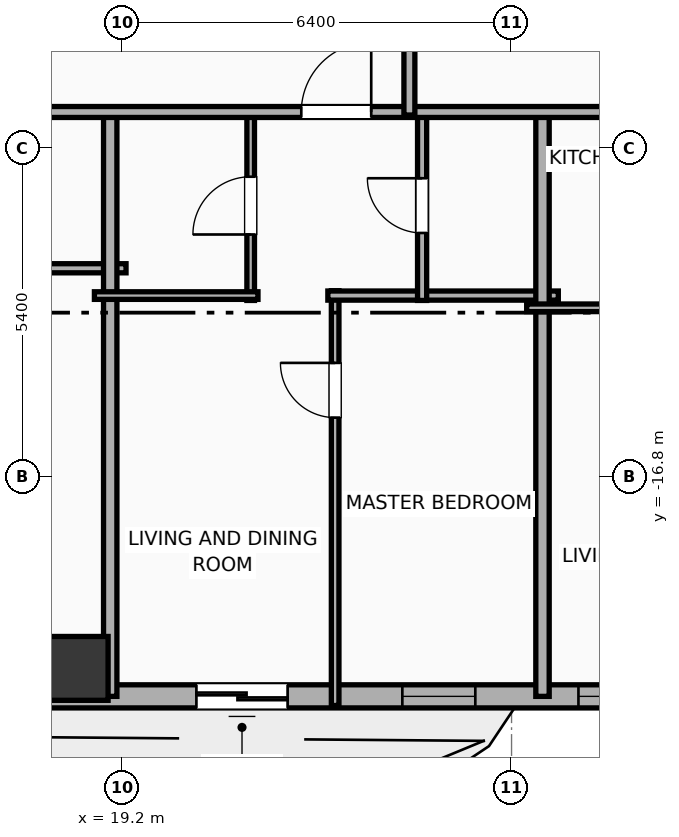
"""IFC4 building model, lengths in metres.
Left out: names, types, materials, properties, quantities, classifications, styles, units other than length and angle.
Written with IfcOpenShell. Run it as: python <this file> out.ifc"""

import sys

from ifc_helpers import new_model, si_unit, direction, frame, frame_2d, origin, origin_2d, place, context, subcontext, project, spatial, rectangle, hollow_rectangle, extrude, element, fill, save


model = new_model("IFC4")
c1 = context("Model", 3, precision=1e-05, world=origin(), true_north=direction((0.0, 1.0)))
c2 = subcontext(c1, "Body", "Model", "MODEL_VIEW")
j1 = project(units=[si_unit("LENGTHUNIT", "METRE"), si_unit("PLANEANGLEUNIT", "RADIAN")], contexts=[c1])
p1 = place(None, origin())
s1 = spatial("IfcSite", under=j1, at=p1, CompositionType="ELEMENT")
p2 = place(p1, origin())
s2 = spatial("IfcBuilding", under=s1, at=p2, CompositionType="ELEMENT")
p3 = place(p2, frame((0.0, 0.0, 85.8)))
s3 = spatial("IfcBuildingStorey", under=s2, at=p3, CompositionType="ELEMENT", Elevation=85.8)
p4 = place(p3, frame((18.44, -19.95, -0.4), z_axis=(0.0, 0.0, 1.0), x_axis=(1.0, 0.0, 0.0)))
e1 = element("IfcColumn", 1, at=p4, inside=s3, PredefinedType="COLUMN", context=c2, shape_type="SweptSolid", body=[
    extrude(hollow_rectangle(XDim=1.05, YDim=1.05, WallThickness=0.036, at=origin_2d()), origin(), (0.0, 0.0, 1.0), 4.3),
])
p5 = place(p3, frame((29.381, -20.41, 0.0), z_axis=(0.0, 0.0, 1.0), x_axis=(-1.0, 0.0, 0.0)))
e2 = element("IfcWall", 2, at=p5, inside=s3, PredefinedType="ELEMENTEDWALL", context=c2, shape_type="SweptSolid", body=[
    extrude(rectangle(XDim=54.763, YDim=0.38, at=frame_2d((27.381, 0.0))), origin(), (0.0, 0.0, 1.0), 2.54),
])
p6 = place(p5, frame((18.486, 0.0, 0.75)))
e3 = element("IfcOpeningElement", 3, at=p6, cuts=e2, PredefinedType="OPENING", context=c2, shape_type="SweptSolid", body=[
    extrude(rectangle(XDim=2.4, YDim=1.45, at=frame_2d((1.2, 0.725))), frame((0.0, 0.2, 0.0), z_axis=(0.0, -1.0, 0.0), x_axis=(1.0, 0.0, 0.0)), (0.0, 0.0, 1.0), 0.4),
])
p7 = place(p5, frame((47.567, 0.0, 0.75)))
e4 = element("IfcOpeningElement", 4, at=p7, cuts=e2, PredefinedType="OPENING", context=c2, shape_type="SweptSolid", body=[
    extrude(rectangle(XDim=2.4, YDim=1.45, at=frame_2d((1.2, 0.725))), frame((0.0, 0.2, 0.0), z_axis=(0.0, -1.0, 0.0), x_axis=(1.0, 0.0, 0.0)), (0.0, 0.0, 1.0), 0.4),
])
p8 = place(p5, frame((7.464, 0.0, 0.0)))
e5 = element("IfcOpeningElement", 5, at=p8, cuts=e2, PredefinedType="OPENING", context=c2, shape_type="SweptSolid", body=[
    extrude(rectangle(XDim=1.5, YDim=2.05, at=frame_2d((0.75, 1.025))), frame((0.0, 0.2, 0.0), z_axis=(0.0, -1.0, 0.0), x_axis=(1.0, 0.0, 0.0)), (0.0, 0.0, 1.0), 0.4),
])
p9 = place(p5, frame((51.831, 0.0, 0.55)))
e6 = element("IfcOpeningElement", 6, at=p9, cuts=e2, PredefinedType="OPENING", context=c2, shape_type="SweptSolid", body=[
    extrude(rectangle(XDim=1.2, YDim=1.15, at=frame_2d((0.6, 0.575))), frame((0.0, 0.2, 0.0), z_axis=(0.0, -1.0, 0.0), x_axis=(1.0, 0.0, 0.0)), (0.0, 0.0, 1.0), 0.4),
])
p10 = place(p5, frame((44.606, 0.0, 0.55)))
e7 = element("IfcOpeningElement", 7, at=p10, cuts=e2, PredefinedType="OPENING", context=c2, shape_type="SweptSolid", body=[
    extrude(rectangle(XDim=1.2, YDim=1.15, at=frame_2d((0.6, 0.575))), frame((0.0, 0.2, 0.0), z_axis=(0.0, -1.0, 0.0), x_axis=(1.0, 0.0, 0.0)), (0.0, 0.0, 1.0), 0.4),
])
p11 = place(p5, frame((38.906, 0.0, 0.55)))
e8 = element("IfcOpeningElement", 8, at=p11, cuts=e2, PredefinedType="OPENING", context=c2, shape_type="SweptSolid", body=[
    extrude(rectangle(XDim=1.2, YDim=1.15, at=frame_2d((0.6, 0.575))), frame((0.0, 0.2, 0.0), z_axis=(0.0, -1.0, 0.0), x_axis=(1.0, 0.0, 0.0)), (0.0, 0.0, 1.0), 0.4),
])
p12 = place(p5, frame((41.656, 0.0, 0.55)))
e9 = element("IfcOpeningElement", 9, at=p12, cuts=e2, PredefinedType="OPENING", context=c2, shape_type="SweptSolid", body=[
    extrude(rectangle(XDim=1.2, YDim=1.15, at=frame_2d((0.6, 0.575))), frame((0.0, 0.2, 0.0), z_axis=(0.0, -1.0, 0.0), x_axis=(1.0, 0.0, 0.0)), (0.0, 0.0, 1.0), 0.4),
])
p13 = place(p5, frame((33.666, 0.0, 0.55)))
e10 = element("IfcOpeningElement", 10, at=p13, cuts=e2, PredefinedType="OPENING", context=c2, shape_type="SweptSolid", body=[
    extrude(rectangle(XDim=1.2, YDim=1.15, at=frame_2d((0.6, 0.575))), frame((0.0, 0.2, 0.0), z_axis=(0.0, -1.0, 0.0), x_axis=(1.0, 0.0, 0.0)), (0.0, 0.0, 1.0), 0.4),
])
p14 = place(p5, frame((36.176, 0.0, 0.55)))
e11 = element("IfcOpeningElement", 11, at=p14, cuts=e2, PredefinedType="OPENING", context=c2, shape_type="SweptSolid", body=[
    extrude(rectangle(XDim=1.2, YDim=1.15, at=frame_2d((0.6, 0.575))), frame((0.0, 0.2, 0.0), z_axis=(0.0, -1.0, 0.0), x_axis=(1.0, 0.0, 0.0)), (0.0, 0.0, 1.0), 0.4),
])
p15 = place(p5, frame((27.861, 0.0, 0.55)))
e12 = element("IfcOpeningElement", 12, at=p15, cuts=e2, PredefinedType="OPENING", context=c2, shape_type="SweptSolid", body=[
    extrude(rectangle(XDim=1.2, YDim=1.15, at=frame_2d((0.6, 0.575))), frame((0.0, 0.2, 0.0), z_axis=(0.0, -1.0, 0.0), x_axis=(1.0, 0.0, 0.0)), (0.0, 0.0, 1.0), 0.4),
])
p16 = place(p5, frame((30.611, 0.0, 0.55)))
e13 = element("IfcOpeningElement", 13, at=p16, cuts=e2, PredefinedType="OPENING", context=c2, shape_type="SweptSolid", body=[
    extrude(rectangle(XDim=1.2, YDim=1.15, at=frame_2d((0.6, 0.575))), frame((0.0, 0.2, 0.0), z_axis=(0.0, -1.0, 0.0), x_axis=(1.0, 0.0, 0.0)), (0.0, 0.0, 1.0), 0.4),
])
p17 = place(p5, frame((23.531, 0.0, 0.55)))
e14 = element("IfcOpeningElement", 14, at=p17, cuts=e2, PredefinedType="OPENING", context=c2, shape_type="SweptSolid", body=[
    extrude(rectangle(XDim=1.2, YDim=1.15, at=frame_2d((0.6, 0.575))), frame((0.0, 0.2, 0.0), z_axis=(0.0, -1.0, 0.0), x_axis=(1.0, 0.0, 0.0)), (0.0, 0.0, 1.0), 0.4),
])
p18 = place(p5, frame((16.386, 0.0, 0.55)))
e15 = element("IfcOpeningElement", 15, at=p18, cuts=e2, PredefinedType="OPENING", context=c2, shape_type="SweptSolid", body=[
    extrude(rectangle(XDim=1.2, YDim=1.15, at=frame_2d((0.6, 0.575))), frame((0.0, 0.2, 0.0), z_axis=(0.0, -1.0, 0.0), x_axis=(1.0, 0.0, 0.0)), (0.0, 0.0, 1.0), 0.4),
])
p19 = place(p5, frame((12.531, 0.0, 0.55)))
e16 = element("IfcOpeningElement", 16, at=p19, cuts=e2, PredefinedType="OPENING", context=c2, shape_type="SweptSolid", body=[
    extrude(rectangle(XDim=1.2, YDim=1.15, at=frame_2d((0.6, 0.575))), frame((0.0, 0.2, 0.0), z_axis=(0.0, -1.0, 0.0), x_axis=(1.0, 0.0, 0.0)), (0.0, 0.0, 1.0), 0.4),
])
p20 = place(p5, frame((4.377, 0.0, 0.55)))
e17 = element("IfcOpeningElement", 17, at=p20, cuts=e2, PredefinedType="OPENING", context=c2, shape_type="SweptSolid", body=[
    extrude(rectangle(XDim=1.2, YDim=1.15, at=frame_2d((0.6, 0.575))), frame((0.0, 0.2, 0.0), z_axis=(0.0, -1.0, 0.0), x_axis=(1.0, 0.0, 0.0)), (0.0, 0.0, 1.0), 0.4),
])
p21 = place(p5, frame((1.481, 0.0, 0.55)))
e18 = element("IfcOpeningElement", 18, at=p21, cuts=e2, PredefinedType="OPENING", context=c2, shape_type="SweptSolid", body=[
    extrude(rectangle(XDim=1.2, YDim=1.15, at=frame_2d((0.6, 0.575))), frame((0.0, 0.2, 0.0), z_axis=(0.0, -1.0, 0.0), x_axis=(1.0, 0.0, 0.0)), (0.0, 0.0, 1.0), 0.4),
])
p22 = place(p3, frame((17.051, -13.37, 0.0), z_axis=(0.0, 0.0, 1.0), x_axis=(1.0, 0.0, 0.0)))
e19 = element("IfcWall", 19, at=p22, inside=s3, PredefinedType="PLUMBINGWALL", context=c2, shape_type="SweptSolid", body=[
    extrude(rectangle(XDim=2.209, YDim=0.15, at=frame_2d((1.104, 0.0))), origin(), (0.0, 0.0, 1.0), 3.65),
])
p23 = place(p3, frame((19.0, -20.41, 0.0), z_axis=(0.0, 0.0, 1.0), x_axis=(0.0, 1.0, 0.0)))
e20 = element("IfcWall", 20, at=p23, inside=s3, PredefinedType="PARTITIONING", context=c2, shape_type="SweptSolid", body=[
    extrude(rectangle(XDim=9.69, YDim=0.22, at=frame_2d((4.845, 0.0))), origin(), (0.0, 0.0, 1.0), 2.54),
])
p24 = place(p3, frame((22.699, -20.56, 0.0), z_axis=(0.0, 0.0, 1.0), x_axis=(0.0, 1.0, 0.0)))
e21 = element("IfcWall", 21, at=p24, inside=s3, PredefinedType="PARTITIONING", context=c2, shape_type="SweptSolid", body=[
    extrude(rectangle(XDim=6.821, YDim=0.125, at=frame_2d((3.411, 0.0))), origin(), (0.0, 0.0, 1.0), 3.65),
])
p25 = place(p24, frame((4.734, 0.0, 0.0)))
e22 = element("IfcOpeningElement", 22, at=p25, cuts=e21, PredefinedType="OPENING", context=c2, shape_type="SweptSolid", body=[
    extrude(rectangle(XDim=0.9, YDim=2.05, at=frame_2d((0.45, 1.025))), frame((0.0, 0.073, 0.0), z_axis=(0.0, -1.0, 0.0), x_axis=(1.0, 0.0, 0.0)), (0.0, 0.0, 1.0), 0.145),
])
p26 = place(p3, frame((22.579, -13.819, 0.0), z_axis=(0.0, 0.0, 1.0), x_axis=(1.0, 0.0, 0.0)))
e23 = element("IfcWall", 23, at=p26, inside=s3, PredefinedType="PLUMBINGWALL", context=c2, shape_type="SweptSolid", body=[
    extrude(rectangle(XDim=3.79, YDim=0.15, at=frame_2d((1.895, 0.0))), origin(), (0.0, 0.0, 1.0), 3.65),
])
p27 = place(p3, frame((21.31, -13.899, 0.0), z_axis=(0.0, 0.0, 1.0), x_axis=(0.0, 1.0, 0.0)))
e24 = element("IfcWall", 24, at=p27, inside=s3, PredefinedType="PARTITIONING", context=c2, shape_type="SweptSolid", body=[
    extrude(rectangle(XDim=3.119, YDim=0.125, at=frame_2d((1.56, 0.0))), origin(), (0.0, 0.0, 1.0), 3.65),
])
p28 = place(p27, frame((1.084, 0.0, 0.0)))
e25 = element("IfcOpeningElement", 25, at=p28, cuts=e24, PredefinedType="OPENING", context=c2, shape_type="SweptSolid", body=[
    extrude(rectangle(XDim=0.95, YDim=2.05, at=frame_2d((0.475, 1.025))), frame((0.0, 0.073, 0.0), z_axis=(0.0, -1.0, 0.0), x_axis=(1.0, 0.0, 0.0)), (0.0, 0.0, 1.0), 0.145),
])
p29 = place(p3, frame((18.74, -13.819, 0.0), z_axis=(0.0, 0.0, 1.0), x_axis=(1.0, 0.0, 0.0)))
e26 = element("IfcWall", 26, at=p29, inside=s3, PredefinedType="PARTITIONING", context=c2, shape_type="SweptSolid", body=[
    extrude(rectangle(XDim=2.69, YDim=0.125, at=frame_2d((1.345, 0.0))), origin(), (0.0, 0.0, 1.0), 3.65),
])
p30 = place(p3, frame((24.129, -13.899, 0.0), z_axis=(0.0, 0.0, 1.0), x_axis=(0.0, 1.0, 0.0)))
e27 = element("IfcWall", 27, at=p30, inside=s3, PredefinedType="PLUMBINGWALL", context=c2, shape_type="SweptSolid", body=[
    extrude(rectangle(XDim=3.119, YDim=0.15, at=frame_2d((1.56, 0.0))), origin(), (0.0, 0.0, 1.0), 3.65),
])
p31 = place(p30, frame((1.11, 0.0, 0.0)))
e28 = element("IfcOpeningElement", 28, at=p31, cuts=e27, PredefinedType="OPENING", context=c2, shape_type="SweptSolid", body=[
    extrude(rectangle(XDim=0.9, YDim=2.05, at=frame_2d((0.45, 1.025))), frame((0.0, 0.085, 0.0), z_axis=(0.0, -1.0, 0.0), x_axis=(1.0, 0.0, 0.0)), (0.0, 0.0, 1.0), 0.17),
])
p32 = place(p3, frame((26.109, -20.41, 0.0), z_axis=(0.0, 0.0, 1.0), x_axis=(0.0, 1.0, 0.0)))
e29 = element("IfcWall", 29, at=p32, inside=s3, PredefinedType="PARTITIONING", context=c2, shape_type="SweptSolid", body=[
    extrude(rectangle(XDim=9.69, YDim=0.22, at=frame_2d((4.845, 0.0))), origin(), (0.0, 0.0, 1.0), 3.65),
])
p33 = place(p3, frame((25.849, -14.02, 0.0), z_axis=(0.0, 0.0, 1.0), x_axis=(1.0, 0.0, 0.0)))
e30 = element("IfcWall", 30, at=p33, inside=s3, PredefinedType="PARTITIONING", context=c2, shape_type="SweptSolid", body=[
    extrude(rectangle(XDim=2.69, YDim=0.125, at=frame_2d((1.345, 0.0))), origin(), (0.0, 0.0, 1.0), 3.65),
])
p34 = place(p3, frame((-29.21, -10.8, 0.0), z_axis=(0.0, 0.0, 1.0), x_axis=(1.0, 0.0, 0.0)))
e31 = element("IfcWall", 31, at=p34, inside=s3, PredefinedType="PARTITIONING", context=c2, shape_type="SweptSolid", body=[
    extrude(rectangle(XDim=62.42, YDim=0.18, at=frame_2d((31.21, 0.0))), origin(), (0.0, 0.0, 1.0), 3.65),
])
p35 = place(p34, frame((3.357, 0.0, 0.0)))
e32 = element("IfcOpeningElement", 32, at=p35, cuts=e31, PredefinedType="OPENING", context=c2, shape_type="SweptSolid", body=[
    extrude(rectangle(XDim=1.15, YDim=2.05, at=frame_2d((0.575, 1.025))), frame((0.0, 0.1, 0.0), z_axis=(0.0, -1.0, 0.0), x_axis=(1.0, 0.0, 0.0)), (0.0, 0.0, 1.0), 0.2),
])
p36 = place(p34, frame((10.998, 0.0, 0.0)))
e33 = element("IfcOpeningElement", 33, at=p36, cuts=e31, PredefinedType="OPENING", context=c2, shape_type="SweptSolid", body=[
    extrude(rectangle(XDim=1.15, YDim=2.05, at=frame_2d((0.575, 1.025))), frame((0.0, 0.1, 0.0), z_axis=(0.0, -1.0, 0.0), x_axis=(1.0, 0.0, 0.0)), (0.0, 0.0, 1.0), 0.2),
])
p37 = place(p34, frame((18.482, 0.0, 0.0)))
e34 = element("IfcOpeningElement", 34, at=p37, cuts=e31, PredefinedType="OPENING", context=c2, shape_type="SweptSolid", body=[
    extrude(rectangle(XDim=1.15, YDim=2.05, at=frame_2d((0.575, 1.025))), frame((0.0, 0.1, 0.0), z_axis=(0.0, -1.0, 0.0), x_axis=(1.0, 0.0, 0.0)), (0.0, 0.0, 1.0), 0.2),
])
p38 = place(p34, frame((23.962, 0.0, 0.0)))
e35 = element("IfcOpeningElement", 35, at=p38, cuts=e31, PredefinedType="OPENING", context=c2, shape_type="SweptSolid", body=[
    extrude(rectangle(XDim=1.15, YDim=2.05, at=frame_2d((0.575, 1.025))), frame((0.0, 0.1, 0.0), z_axis=(0.0, -1.0, 0.0), x_axis=(1.0, 0.0, 0.0)), (0.0, 0.0, 1.0), 0.2),
])
p39 = place(p34, frame((29.524, 0.0, 0.0)))
e36 = element("IfcOpeningElement", 36, at=p39, cuts=e31, PredefinedType="OPENING", context=c2, shape_type="SweptSolid", body=[
    extrude(rectangle(XDim=1.15, YDim=2.05, at=frame_2d((0.575, 1.025))), frame((0.0, 0.1, 0.0), z_axis=(0.0, -1.0, 0.0), x_axis=(1.0, 0.0, 0.0)), (0.0, 0.0, 1.0), 0.2),
])
p40 = place(p34, frame((34.218, 0.0, 0.0)))
e37 = element("IfcOpeningElement", 37, at=p40, cuts=e31, PredefinedType="OPENING", context=c2, shape_type="SweptSolid", body=[
    extrude(rectangle(XDim=0.9, YDim=2.05, at=frame_2d((0.45, 1.025))), frame((0.0, 0.1, 0.0), z_axis=(0.0, -1.0, 0.0), x_axis=(1.0, 0.0, 0.0)), (0.0, 0.0, 1.0), 0.2),
])
p41 = place(p34, frame((38.313, 0.0, 0.0)))
e38 = element("IfcOpeningElement", 38, at=p41, cuts=e31, PredefinedType="OPENING", context=c2, shape_type="SweptSolid", body=[
    extrude(rectangle(XDim=1.15, YDim=2.05, at=frame_2d((0.575, 1.025))), frame((0.0, 0.1, 0.0), z_axis=(0.0, -1.0, 0.0), x_axis=(1.0, 0.0, 0.0)), (0.0, 0.0, 1.0), 0.2),
])
p42 = place(p34, frame((45.223, 0.0, 0.0)))
e39 = element("IfcOpeningElement", 39, at=p42, cuts=e31, PredefinedType="OPENING", context=c2, shape_type="SweptSolid", body=[
    extrude(rectangle(XDim=0.9, YDim=2.05, at=frame_2d((0.45, 1.025))), frame((0.0, 0.1, 0.0), z_axis=(0.0, -1.0, 0.0), x_axis=(1.0, 0.0, 0.0)), (0.0, 0.0, 1.0), 0.2),
])
p43 = place(p34, frame((51.352, 0.0, 0.0)))
e40 = element("IfcOpeningElement", 40, at=p43, cuts=e31, PredefinedType="OPENING", context=c2, shape_type="SweptSolid", body=[
    extrude(rectangle(XDim=1.15, YDim=2.05, at=frame_2d((0.575, 1.025))), frame((0.0, 0.1, 0.0), z_axis=(0.0, -1.0, 0.0), x_axis=(1.0, 0.0, 0.0)), (0.0, 0.0, 1.0), 0.2),
])
p44 = place(p34, frame((58.493, 0.0, 0.0)))
e41 = element("IfcOpeningElement", 41, at=p44, cuts=e31, PredefinedType="OPENING", context=c2, shape_type="SweptSolid", body=[
    extrude(rectangle(XDim=1.15, YDim=2.05, at=frame_2d((0.575, 1.025))), frame((0.0, 0.1, 0.0), z_axis=(0.0, -1.0, 0.0), x_axis=(1.0, 0.0, 0.0)), (0.0, 0.0, 1.0), 0.2),
])
p45 = place(p3, frame((23.92, -10.85, 0.0), z_axis=(0.0, 0.0, 1.0), x_axis=(0.0, 1.0, 0.0)))
e42 = element("IfcWall", 42, at=p45, inside=s3, PredefinedType="PARTITIONING", context=c2, shape_type="SweptSolid", body=[
    extrude(rectangle(XDim=21.7, YDim=0.18, at=frame_2d((10.85, 0.0))), origin(), (0.0, 0.0, 1.0), 3.65),
])
p46 = place(p45, frame((18.835, 0.0, 0.0)))
e43 = element("IfcOpeningElement", 43, at=p46, cuts=e42, PredefinedType="OPENING", context=c2, shape_type="SweptSolid", body=[
    extrude(rectangle(XDim=0.95, YDim=2.05, at=frame_2d((0.475, 1.025))), frame((0.0, 0.1, 0.0), z_axis=(0.0, -1.0, 0.0), x_axis=(1.0, 0.0, 0.0)), (0.0, 0.0, 1.0), 0.2),
])
p47 = place(p8, origin())
e44 = element("IfcDoor", 44, at=p47, inside=s3, OperationType="SLIDING_TO_RIGHT", PredefinedType="DOOR", context=c2, shape_type="SweptSolid", body=[
    extrude(rectangle(XDim=1.5, YDim=2.05, at=frame_2d((0.75, 1.025))), frame((0.0, 0.025, 0.0), z_axis=(0.0, -1.0, 0.0), x_axis=(1.0, 0.0, 0.0)), (0.0, 0.0, 1.0), 0.05),
])
fill(e5, e44)
p48 = place(p20, origin())
e45 = element("IfcWindow", 45, at=p48, inside=s3, PartitioningType="SINGLE_PANEL", PredefinedType="WINDOW", context=c2, shape_type="SweptSolid", body=[
    extrude(rectangle(XDim=1.2, YDim=1.15, at=frame_2d((0.6, 0.575))), frame((0.0, 0.03, 0.0), z_axis=(0.0, -1.0, 0.0), x_axis=(1.0, 0.0, 0.0)), (0.0, 0.0, 1.0), 0.06),
])
fill(e17, e45)
p49 = place(p21, origin())
e46 = element("IfcWindow", 46, at=p49, inside=s3, PartitioningType="SINGLE_PANEL", PredefinedType="WINDOW", context=c2, shape_type="SweptSolid", body=[
    extrude(rectangle(XDim=1.2, YDim=1.15, at=frame_2d((0.6, 0.575))), frame((0.0, 0.03, 0.0), z_axis=(0.0, -1.0, 0.0), x_axis=(1.0, 0.0, 0.0)), (0.0, 0.0, 1.0), 0.06),
])
fill(e18, e46)
p50 = place(p25, origin())
e47 = element("IfcDoor", 47, at=p50, inside=s3, OperationType="SINGLE_SWING_RIGHT", PredefinedType="DOOR", context=c2, shape_type="SweptSolid", body=[
    extrude(rectangle(XDim=0.9, YDim=2.05, at=frame_2d((0.45, 1.025))), frame((0.0, 0.025, 0.0), z_axis=(0.0, -1.0, 0.0), x_axis=(1.0, 0.0, 0.0)), (0.0, 0.0, 1.0), 0.05),
])
fill(e22, e47)
p51 = place(p28, origin())
e48 = element("IfcDoor", 48, at=p51, inside=s3, OperationType="SINGLE_SWING_LEFT", PredefinedType="DOOR", context=c2, shape_type="SweptSolid", body=[
    extrude(rectangle(XDim=0.95, YDim=2.05, at=frame_2d((0.475, 1.025))), frame((0.0, 0.025, 0.0), z_axis=(0.0, -1.0, 0.0), x_axis=(1.0, 0.0, 0.0)), (0.0, 0.0, 1.0), 0.05),
])
fill(e25, e48)
p52 = place(p31, origin())
e49 = element("IfcDoor", 49, at=p52, inside=s3, OperationType="SINGLE_SWING_RIGHT", PredefinedType="DOOR", context=c2, shape_type="SweptSolid", body=[
    extrude(rectangle(XDim=0.9, YDim=2.05, at=frame_2d((0.45, 1.025))), frame((0.0, 0.025, 0.0), z_axis=(0.0, -1.0, 0.0), x_axis=(1.0, 0.0, 0.0)), (0.0, 0.0, 1.0), 0.05),
])
fill(e28, e49)
p53 = place(p43, origin())
e50 = element("IfcDoor", 50, at=p53, inside=s3, OperationType="SINGLE_SWING_RIGHT", PredefinedType="DOOR", context=c2, shape_type="SweptSolid", body=[
    extrude(rectangle(XDim=1.15, YDim=2.05, at=frame_2d((0.575, 1.025))), frame((0.0, 0.025, 0.0), z_axis=(0.0, -1.0, 0.0), x_axis=(1.0, 0.0, 0.0)), (0.0, 0.0, 1.0), 0.05),
])
fill(e40, e50)
save(model, sys.argv[1])
